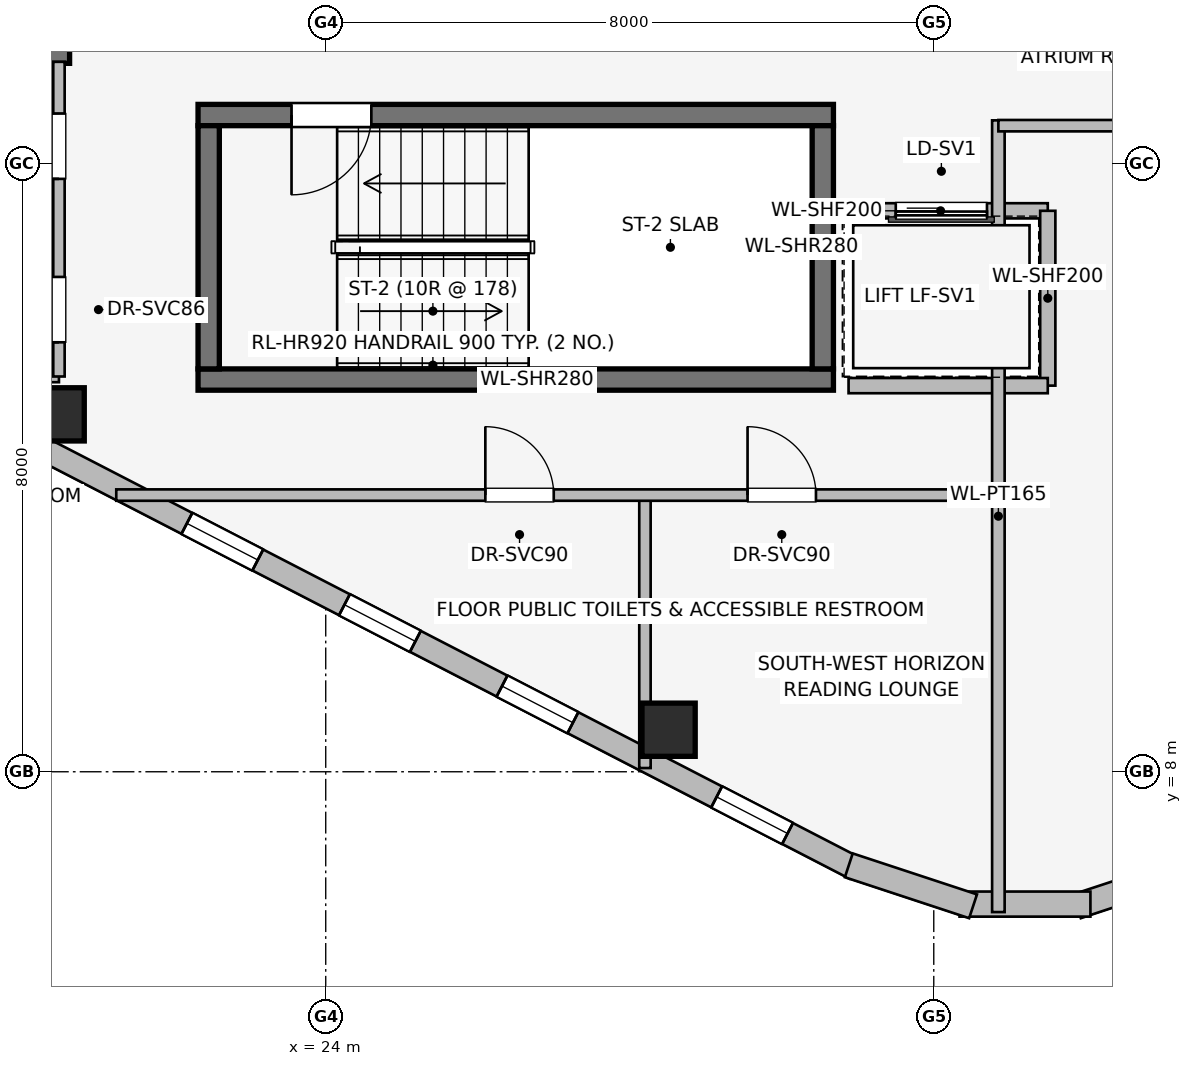
"""IFC4 building model, lengths in metres.
Left out: names, types, materials, properties, quantities, classifications, styles, units other than length and angle.
Written with IfcOpenShell. Run it as: python <this file> out.ifc"""

import sys

from ifc_helpers import new_model, si_unit, direction, frame, frame_2d, origin, origin_2d, place, context, subcontext, project, spatial, rectangle, extrude, element, fill, save


model = new_model("IFC4")
c1 = context("Model", 3, precision=1e-05, world=origin(), true_north=direction((0.0, 1.0)))
c2 = subcontext(c1, "Body", "Model", "MODEL_VIEW")
j1 = project(units=[si_unit("LENGTHUNIT", "METRE"), si_unit("PLANEANGLEUNIT", "RADIAN")], contexts=[c1])
p1 = place(None, origin())
s1 = spatial("IfcSite", under=j1, at=p1, CompositionType="ELEMENT")
p2 = place(p1, origin())
s2 = spatial("IfcBuilding", under=s1, at=p2, CompositionType="ELEMENT")
p3 = place(p2, frame((0.0, 0.0, 224.15)))
s3 = spatial("IfcBuildingStorey", under=s2, at=p3, CompositionType="ELEMENT", Elevation=224.15)
p4 = place(p3, frame((16.87, 17.46, 0.0), z_axis=(0.0, 0.0, 1.0), x_axis=(1.0, 0.0, 0.0)))
e1 = element("IfcWall", 1, at=p4, inside=s3, PredefinedType="SHEAR", context=c2, shape_type="SweptSolid", body=[
    extrude(rectangle(XDim=3.76, YDim=0.28, at=frame_2d((1.88, 0.0))), origin(), (0.0, 0.0, 1.0), 3.55),
])
p5 = place(p3, frame((22.32, 13.16, 0.0), z_axis=(0.0, 0.0, 1.0), x_axis=(1.0, 0.0, 0.0)))
e2 = element("IfcWall", 2, at=p5, inside=s3, PredefinedType="SHEAR", context=c2, shape_type="SweptSolid", body=[
    extrude(rectangle(XDim=8.36, YDim=0.28, at=frame_2d((4.18, 0.0))), origin(), (0.0, 0.0, 1.0), 3.55),
])
p6 = place(p3, frame((30.68, 16.64, 0.0), z_axis=(0.0, 0.0, 1.0), x_axis=(-1.0, 0.0, 0.0)))
e3 = element("IfcWall", 3, at=p6, inside=s3, PredefinedType="SHEAR", context=c2, shape_type="SweptSolid", body=[
    extrude(rectangle(XDim=8.36, YDim=0.28, at=frame_2d((4.18, 0.0))), origin(), (0.0, 0.0, 1.0), 3.55),
])
p7 = place(p6, frame((6.08, 0.0, 0.0)))
e4 = element("IfcOpeningElement", 4, at=p7, cuts=e3, PredefinedType="OPENING", context=c2, shape_type="SweptSolid", body=[
    extrude(rectangle(XDim=1.05, YDim=2.0, at=frame_2d((0.525, 1.0))), frame((0.0, 0.15, 0.0), z_axis=(0.0, -1.0, 0.0), x_axis=(1.0, 0.0, 0.0)), (0.0, 0.0, 1.0), 0.3),
])
for number, where, z_axis, x_axis in (
    (5, (22.46, 16.5, 0.0), (0.0, 0.0, 1.0), (0.0, -1.0, 0.0)),
    (6, (30.54, 13.3, 0.0), (0.0, 0.0, 1.0), (0.0, 1.0, 0.0)),
):
    element("IfcWall", number, at=place(p3, frame(where, z_axis=z_axis, x_axis=x_axis)), inside=s3, PredefinedType="SHEAR", context=c2, shape_type="SweptSolid", body=[
        extrude(rectangle(XDim=3.2, YDim=0.28, at=frame_2d((1.6, 0.0))), origin(), (0.0, 0.0, 1.0), 3.55),
    ])
for number, where, z_axis, x_axis in (
    (7, (20.473, 12.702, 0.0), (0.0, 0.0, 1.0), (1.0, 0.0, 0.0)),
    (8, (28.511, 8.553, 0.0), (0.0, 0.0, 1.0), (1.0, 0.0, 0.0)),
):
    element("IfcColumn", number, at=place(p3, frame(where, z_axis=z_axis, x_axis=x_axis)), inside=s3, PredefinedType="COLUMN", context=c2, shape_type="SweptSolid", body=[
        extrude(rectangle(XDim=0.7, YDim=0.7, at=origin_2d()), origin(), (0.0, 0.0, 1.0), 3.55),
    ])
p8 = place(p3, frame((30.963, 6.73, 0.0), z_axis=(0.0, 0.0, 1.0), x_axis=(-0.888581481622, 0.458718814218, 0.0)))
e9 = element("IfcWall", 9, at=p8, inside=s3, PredefinedType="STANDARD", context=c2, shape_type="SweptSolid", body=[
    extrude(rectangle(XDim=15.077, YDim=0.31, at=frame_2d((7.539, 0.0))), origin(), (0.0, 0.0, 1.0), 2.594),
])
p9 = place(p8, frame((0.998, 0.0, 0.75)))
e10 = element("IfcOpeningElement", 10, at=p9, cuts=e9, PredefinedType="OPENING", context=c2, shape_type="SweptSolid", body=[
    extrude(rectangle(XDim=1.05, YDim=1.4, at=frame_2d((0.525, 0.7))), frame((0.0, 0.165, 0.0), z_axis=(0.0, -1.0, 0.0), x_axis=(1.0, 0.0, 0.0)), (0.0, 0.0, 1.0), 0.33),
])
p10 = place(p8, frame((4.176, 0.0, 0.75)))
e11 = element("IfcOpeningElement", 11, at=p10, cuts=e9, PredefinedType="OPENING", context=c2, shape_type="SweptSolid", body=[
    extrude(rectangle(XDim=1.05, YDim=1.4, at=frame_2d((0.525, 0.7))), frame((0.0, 0.165, 0.0), z_axis=(0.0, -1.0, 0.0), x_axis=(1.0, 0.0, 0.0)), (0.0, 0.0, 1.0), 0.33),
])
p11 = place(p8, frame((6.509, 0.0, 0.75)))
e12 = element("IfcOpeningElement", 12, at=p11, cuts=e9, PredefinedType="OPENING", context=c2, shape_type="SweptSolid", body=[
    extrude(rectangle(XDim=1.05, YDim=1.4, at=frame_2d((0.525, 0.7))), frame((0.0, 0.165, 0.0), z_axis=(0.0, -1.0, 0.0), x_axis=(1.0, 0.0, 0.0)), (0.0, 0.0, 1.0), 0.33),
])
p12 = place(p8, frame((8.842, 0.0, 0.75)))
e13 = element("IfcOpeningElement", 13, at=p12, cuts=e9, PredefinedType="OPENING", context=c2, shape_type="SweptSolid", body=[
    extrude(rectangle(XDim=1.05, YDim=1.4, at=frame_2d((0.525, 0.7))), frame((0.0, 0.165, 0.0), z_axis=(0.0, -1.0, 0.0), x_axis=(1.0, 0.0, 0.0)), (0.0, 0.0, 1.0), 0.33),
])
p13 = place(p3, frame((35.518, 6.769, 0.0), z_axis=(0.0, 0.0, 1.0), x_axis=(-0.949713440491, -0.313120393699, 0.0)))
e14 = element("IfcWall", 14, at=p13, inside=s3, PredefinedType="STANDARD", context=c2, shape_type="SweptSolid", body=[
    extrude(rectangle(XDim=1.722, YDim=0.33, at=frame_2d((0.861, 0.0))), origin(), (0.0, 0.0, 1.0), 3.29),
])
p14 = place(p3, frame((34.061, 6.259, 0.0), z_axis=(0.0, 0.0, 1.0), x_axis=(-1.0, 0.0, 0.0)))
e15 = element("IfcWall", 15, at=p14, inside=s3, PredefinedType="STANDARD", context=c2, shape_type="SweptSolid", body=[
    extrude(rectangle(XDim=1.722, YDim=0.33, at=frame_2d((0.861, 0.0))), origin(), (0.0, 0.0, 1.0), 3.29),
])
p15 = place(p3, frame((32.517, 6.23, 0.0), z_axis=(0.0, 0.0, 1.0), x_axis=(-0.949713440491, 0.313120393699, 0.0)))
e16 = element("IfcWall", 16, at=p15, inside=s3, PredefinedType="STANDARD", context=c2, shape_type="SweptSolid", body=[
    extrude(rectangle(XDim=1.722, YDim=0.33, at=frame_2d((0.861, 0.0))), origin(), (0.0, 0.0, 1.0), 3.29),
])
p16 = place(p3, frame((33.5, 15.38, 0.0), z_axis=(0.0, 0.0, 1.0), x_axis=(-1.0, 0.0, 0.0)))
e17 = element("IfcWall", 17, at=p16, inside=s3, PredefinedType="PARTITIONING", context=c2, shape_type="SweptSolid", body=[
    extrude(rectangle(XDim=2.82, YDim=0.2, at=frame_2d((1.41, 0.0))), origin(), (0.0, 0.0, 1.0), 3.29),
])
p17 = place(p16, frame((0.8, 0.0, 0.0)))
e18 = element("IfcOpeningElement", 18, at=p17, cuts=e17, PredefinedType="OPENING", context=c2, shape_type="SweptSolid", body=[
    extrude(rectangle(XDim=1.2, YDim=2.2, at=frame_2d((0.6, 1.1))), frame((0.0, 0.11, 0.0), z_axis=(0.0, -1.0, 0.0), x_axis=(1.0, 0.0, 0.0)), (0.0, 0.0, 1.0), 0.22),
])
p18 = place(p3, frame((33.5, 13.08, 0.0), z_axis=(0.0, 0.0, 1.0), x_axis=(0.0, 1.0, 0.0)))
e19 = element("IfcWall", 19, at=p18, inside=s3, PredefinedType="PARTITIONING", context=c2, shape_type="SweptSolid", body=[
    extrude(rectangle(XDim=2.3, YDim=0.2, at=frame_2d((1.15, 0.0))), origin(), (0.0, 0.0, 1.0), 3.29),
])
p19 = place(p3, frame((30.879, 13.08, 0.0), z_axis=(0.0, 0.0, 1.0), x_axis=(1.0, 0.0, 0.0)))
e20 = element("IfcWall", 20, at=p19, inside=s3, PredefinedType="PARTITIONING", context=c2, shape_type="SweptSolid", body=[
    extrude(rectangle(XDim=2.621, YDim=0.2, at=frame_2d((1.311, 0.0))), origin(), (0.0, 0.0, 1.0), 3.29),
])
p20 = place(p3, frame((18.113, 13.2, 0.0), z_axis=(0.0, 0.0, 1.0), x_axis=(1.0, 0.0, 0.0)))
e21 = element("IfcWall", 21, at=p20, inside=s3, PredefinedType="PARTITIONING", context=c2, shape_type="SweptSolid", body=[
    extrude(rectangle(XDim=2.377, YDim=0.15, at=frame_2d((1.188, 0.0))), origin(), (0.0, 0.0, 1.0), 3.29),
])
p21 = place(p3, frame((18.1, 15.22, 0.0), z_axis=(0.0, 0.0, 1.0), x_axis=(1.0, 0.0, 0.0)))
e22 = element("IfcWall", 22, at=p21, inside=s3, PredefinedType="PARTITIONING", context=c2, shape_type="SweptSolid", body=[
    extrude(rectangle(XDim=2.39, YDim=0.15, at=frame_2d((1.195, 0.0))), origin(), (0.0, 0.0, 1.0), 3.29),
])
p22 = place(p3, frame((20.49, 13.2, 0.0), z_axis=(0.0, 0.0, 1.0), x_axis=(0.0, 1.0, 0.0)))
e23 = element("IfcWall", 23, at=p22, inside=s3, PredefinedType="PARTITIONING", context=c2, shape_type="SweptSolid", body=[
    extrude(rectangle(XDim=4.14, YDim=0.15, at=frame_2d((2.07, 0.0))), origin(), (0.0, 0.0, 1.0), 3.29),
])
p23 = place(p22, frame((0.45, 0.0, 0.0)))
e24 = element("IfcOpeningElement", 24, at=p23, cuts=e23, PredefinedType="OPENING", context=c2, shape_type="SweptSolid", body=[
    extrude(rectangle(XDim=0.86, YDim=2.0, at=frame_2d((0.43, 1.0))), frame((0.0, 0.085, 0.0), z_axis=(0.0, -1.0, 0.0), x_axis=(1.0, 0.0, 0.0)), (0.0, 0.0, 1.0), 0.17),
])
p24 = place(p22, frame((2.6, 0.0, 0.0)))
e25 = element("IfcOpeningElement", 25, at=p24, cuts=e23, PredefinedType="OPENING", context=c2, shape_type="SweptSolid", body=[
    extrude(rectangle(XDim=0.86, YDim=2.0, at=frame_2d((0.43, 1.0))), frame((0.0, 0.085, 0.0), z_axis=(0.0, -1.0, 0.0), x_axis=(1.0, 0.0, 0.0)), (0.0, 0.0, 1.0), 0.17),
])
p25 = place(p3, frame((32.85, 6.154, 0.0), z_axis=(0.0, 0.0, 1.0), x_axis=(0.0, 1.0, 0.0)))
e26 = element("IfcWall", 26, at=p25, inside=s3, PredefinedType="PARTITIONING", context=c2, shape_type="SweptSolid", body=[
    extrude(rectangle(XDim=10.416, YDim=0.165, at=frame_2d((5.208, 0.0))), origin(), (0.0, 0.0, 1.0), 3.29),
])
p26 = place(p3, frame((28.2, 8.049, 0.0), z_axis=(0.0, 0.0, 1.0), x_axis=(0.0, 1.0, 0.0)))
e27 = element("IfcWall", 27, at=p26, inside=s3, PredefinedType="PARTITIONING", context=c2, shape_type="SweptSolid", body=[
    extrude(rectangle(XDim=3.591, YDim=0.15, at=frame_2d((1.795, 0.0))), origin(), (0.0, 0.0, 1.0), 3.29),
])
p27 = place(p3, frame((21.244, 11.64, 0.0), z_axis=(0.0, 0.0, 1.0), x_axis=(1.0, 0.0, 0.0)))
e28 = element("IfcWall", 28, at=p27, inside=s3, PredefinedType="PARTITIONING", context=c2, shape_type="SweptSolid", body=[
    extrude(rectangle(XDim=11.606, YDim=0.15, at=frame_2d((5.803, 0.0))), origin(), (0.0, 0.0, 1.0), 2.833),
])
p28 = place(p27, frame((4.856, 0.0, 0.0)))
e29 = element("IfcOpeningElement", 29, at=p28, cuts=e28, PredefinedType="OPENING", context=c2, shape_type="SweptSolid", body=[
    extrude(rectangle(XDim=0.9, YDim=2.0, at=frame_2d((0.45, 1.0))), frame((0.0, 0.085, 0.0), z_axis=(0.0, -1.0, 0.0), x_axis=(1.0, 0.0, 0.0)), (0.0, 0.0, 1.0), 0.17),
])
p29 = place(p27, frame((8.306, 0.0, 0.0)))
e30 = element("IfcOpeningElement", 30, at=p29, cuts=e28, PredefinedType="OPENING", context=c2, shape_type="SweptSolid", body=[
    extrude(rectangle(XDim=0.9, YDim=2.0, at=frame_2d((0.45, 1.0))), frame((0.0, 0.085, 0.0), z_axis=(0.0, -1.0, 0.0), x_axis=(1.0, 0.0, 0.0)), (0.0, 0.0, 1.0), 0.17),
])
p30 = place(p3, frame((32.85, 16.5, 0.0), z_axis=(0.0, 0.0, 1.0), x_axis=(1.0, 0.0, 0.0)))
e31 = element("IfcWall", 31, at=p30, inside=s3, PredefinedType="PARTITIONING", context=c2, shape_type="SweptSolid", body=[
    extrude(rectangle(XDim=8.61, YDim=0.15, at=frame_2d((4.305, 0.0))), origin(), (0.0, 0.0, 1.0), 3.29),
])
p31 = place(p30, frame((3.825, 0.0, 0.0)))
e32 = element("IfcOpeningElement", 32, at=p31, cuts=e31, PredefinedType="OPENING", context=c2, shape_type="SweptSolid", body=[
    extrude(rectangle(XDim=0.96, YDim=2.0, at=frame_2d((0.48, 1.0))), frame((0.0, 0.085, 0.0), z_axis=(0.0, -1.0, 0.0), x_axis=(1.0, 0.0, 0.0)), (0.0, 0.0, 1.0), 0.17),
])
p32 = place(p9, origin())
e33 = element("IfcWindow", 33, at=p32, inside=s3, PartitioningType="SINGLE_PANEL", PredefinedType="WINDOW", context=c2, shape_type="SweptSolid", body=[
    extrude(rectangle(XDim=1.05, YDim=1.4, at=frame_2d((0.525, 0.7))), frame((0.0, 0.03, 0.0), z_axis=(0.0, -1.0, 0.0), x_axis=(1.0, 0.0, 0.0)), (0.0, 0.0, 1.0), 0.06),
])
fill(e10, e33)
p33 = place(p10, origin())
e34 = element("IfcWindow", 34, at=p33, inside=s3, PartitioningType="SINGLE_PANEL", PredefinedType="WINDOW", context=c2, shape_type="SweptSolid", body=[
    extrude(rectangle(XDim=1.05, YDim=1.4, at=frame_2d((0.525, 0.7))), frame((0.0, 0.03, 0.0), z_axis=(0.0, -1.0, 0.0), x_axis=(1.0, 0.0, 0.0)), (0.0, 0.0, 1.0), 0.06),
])
fill(e11, e34)
p34 = place(p11, origin())
e35 = element("IfcWindow", 35, at=p34, inside=s3, PartitioningType="SINGLE_PANEL", PredefinedType="WINDOW", context=c2, shape_type="SweptSolid", body=[
    extrude(rectangle(XDim=1.05, YDim=1.4, at=frame_2d((0.525, 0.7))), frame((0.0, 0.03, 0.0), z_axis=(0.0, -1.0, 0.0), x_axis=(1.0, 0.0, 0.0)), (0.0, 0.0, 1.0), 0.06),
])
fill(e12, e35)
p35 = place(p12, origin())
e36 = element("IfcWindow", 36, at=p35, inside=s3, PartitioningType="SINGLE_PANEL", PredefinedType="WINDOW", context=c2, shape_type="SweptSolid", body=[
    extrude(rectangle(XDim=1.05, YDim=1.4, at=frame_2d((0.525, 0.7))), frame((0.0, 0.03, 0.0), z_axis=(0.0, -1.0, 0.0), x_axis=(1.0, 0.0, 0.0)), (0.0, 0.0, 1.0), 0.06),
])
fill(e13, e36)
p36 = place(p7, origin())
e37 = element("IfcDoor", 37, at=p36, inside=s3, OperationType="SINGLE_SWING_RIGHT", PredefinedType="DOOR", context=c2, shape_type="SweptSolid", body=[
    extrude(rectangle(XDim=1.05, YDim=2.0, at=frame_2d((0.525, 1.0))), frame((0.0, 0.025, 0.0), z_axis=(0.0, -1.0, 0.0), x_axis=(1.0, 0.0, 0.0)), (0.0, 0.0, 1.0), 0.05),
])
fill(e4, e37)
p37 = place(p17, origin())
e38 = element("IfcDoor", 38, at=p37, inside=s3, OperationType="SLIDING_TO_RIGHT", PredefinedType="DOOR", context=c2, shape_type="SweptSolid", body=[
    extrude(rectangle(XDim=1.2, YDim=2.2, at=frame_2d((0.6, 1.1))), frame((0.0, 0.025, 0.0), z_axis=(0.0, -1.0, 0.0), x_axis=(1.0, 0.0, 0.0)), (0.0, 0.0, 1.0), 0.05),
])
fill(e18, e38)
p38 = place(p23, origin())
e39 = element("IfcDoor", 39, at=p38, inside=s3, OperationType="SINGLE_SWING_LEFT", PredefinedType="DOOR", context=c2, shape_type="SweptSolid", body=[
    extrude(rectangle(XDim=0.86, YDim=2.0, at=frame_2d((0.43, 1.0))), frame((0.0, 0.025, 0.0), z_axis=(0.0, -1.0, 0.0), x_axis=(1.0, 0.0, 0.0)), (0.0, 0.0, 1.0), 0.05),
])
fill(e24, e39)
p39 = place(p24, origin())
e40 = element("IfcDoor", 40, at=p39, inside=s3, OperationType="SINGLE_SWING_LEFT", PredefinedType="DOOR", context=c2, shape_type="SweptSolid", body=[
    extrude(rectangle(XDim=0.86, YDim=2.0, at=frame_2d((0.43, 1.0))), frame((0.0, 0.025, 0.0), z_axis=(0.0, -1.0, 0.0), x_axis=(1.0, 0.0, 0.0)), (0.0, 0.0, 1.0), 0.05),
])
fill(e25, e40)
p40 = place(p28, origin())
e41 = element("IfcDoor", 41, at=p40, inside=s3, OperationType="SINGLE_SWING_LEFT", PredefinedType="DOOR", context=c2, shape_type="SweptSolid", body=[
    extrude(rectangle(XDim=0.9, YDim=2.0, at=frame_2d((0.45, 1.0))), frame((0.0, 0.025, 0.0), z_axis=(0.0, -1.0, 0.0), x_axis=(1.0, 0.0, 0.0)), (0.0, 0.0, 1.0), 0.05),
])
fill(e29, e41)
p41 = place(p29, origin())
e42 = element("IfcDoor", 42, at=p41, inside=s3, OperationType="SINGLE_SWING_LEFT", PredefinedType="DOOR", context=c2, shape_type="SweptSolid", body=[
    extrude(rectangle(XDim=0.9, YDim=2.0, at=frame_2d((0.45, 1.0))), frame((0.0, 0.025, 0.0), z_axis=(0.0, -1.0, 0.0), x_axis=(1.0, 0.0, 0.0)), (0.0, 0.0, 1.0), 0.05),
])
fill(e30, e42)
save(model, sys.argv[1])
